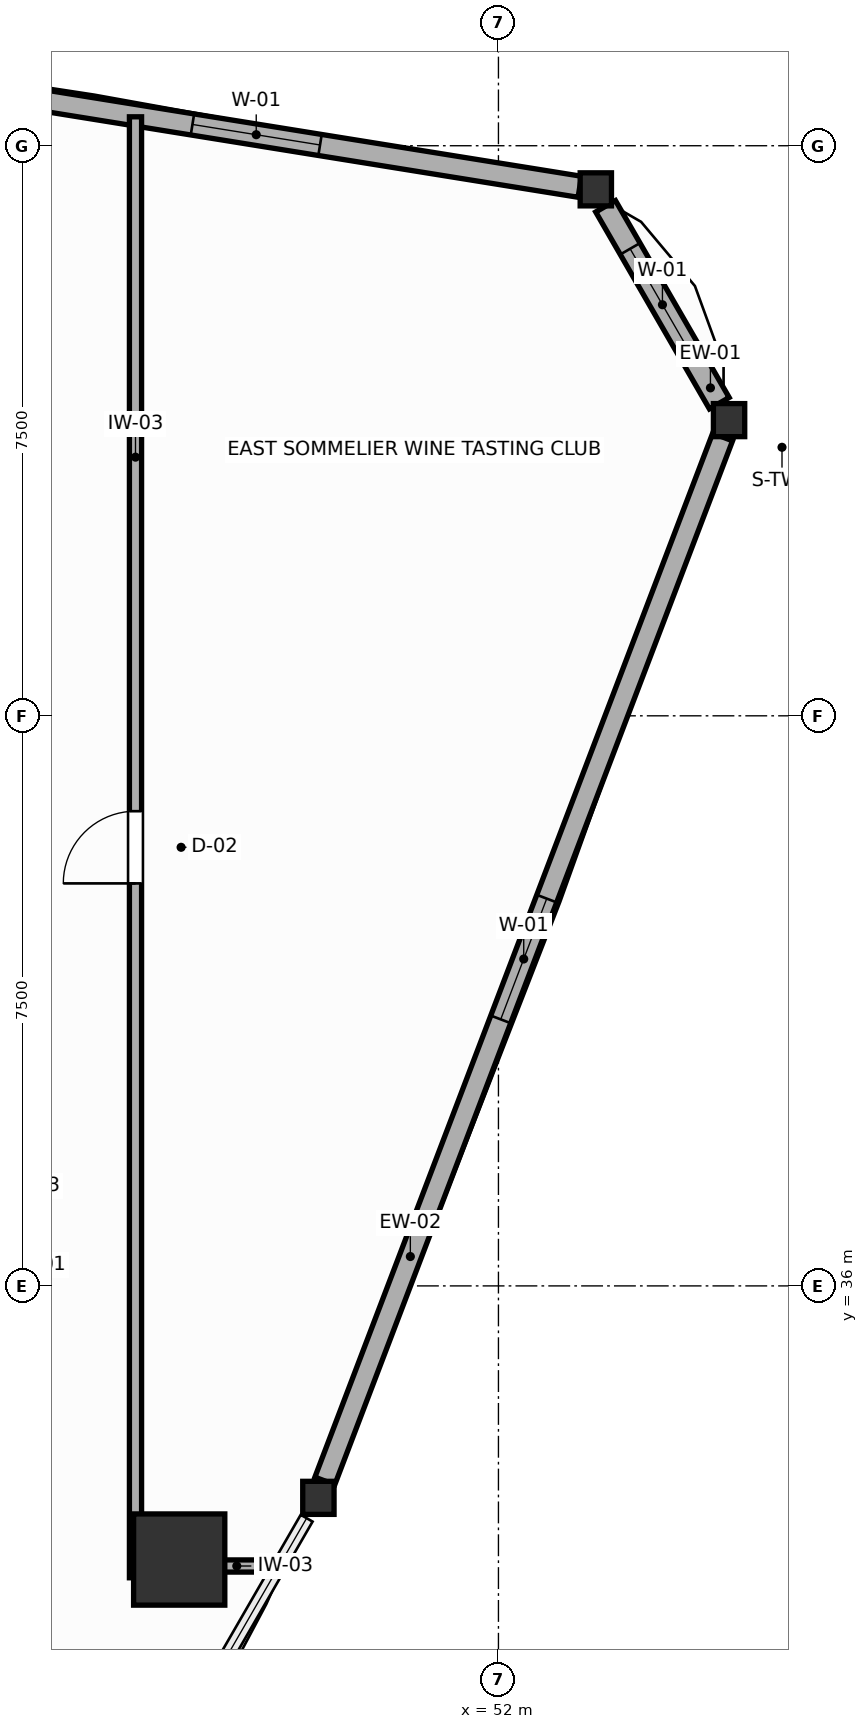
"""IFC4 building model, lengths in metres.
Left out: names, types, materials, properties, quantities, classifications, styles, units other than length and angle.
Written with IfcOpenShell. Run it as: python <this file> out.ifc"""

import sys

from ifc_helpers import new_model, si_unit, direction, frame, frame_2d, origin, origin_2d, place, context, subcontext, project, spatial, rectangle, i_section, extrude, source, transform, mapped, element, fill, save


model = new_model("IFC4")
c1 = context("Model", 3, precision=1e-05, world=origin(), true_north=direction((0.0, 1.0)))
c2 = subcontext(c1, "Body", "Model", "MODEL_VIEW")
j1 = project(units=[si_unit("LENGTHUNIT", "METRE"), si_unit("PLANEANGLEUNIT", "RADIAN")], contexts=[c1])
p1 = place(None, origin())
s1 = spatial("IfcSite", under=j1, at=p1, CompositionType="ELEMENT")
p2 = place(p1, origin())
s2 = spatial("IfcBuilding", under=s1, at=p2, CompositionType="ELEMENT")
p3 = place(p2, frame((0.0, 0.0, 147.0)))
s3 = spatial("IfcBuildingStorey", under=s2, at=p3, CompositionType="ELEMENT", Elevation=147.0)
m1 = source(origin(), c2, "Body", "SweptSolid", [
    extrude(rectangle(XDim=1.2, YDim=1.2, at=origin_2d()), origin(), (0.0, 0.0, 1.0), 3.6),
])
p4 = place(p3, frame((47.8, 32.4, 0.0), z_axis=(0.0, 0.0, 1.0), x_axis=(1.0, 0.0, 0.0)))
e1 = element("IfcColumn", 1, at=p4, inside=s3, PredefinedType="COLUMN", context=c2, shape_type="MappedRepresentation", body=[
    mapped(m1, transform((0.0, 0.0, 0.0), scale=1.0)),
])
m2 = source(origin(), c2, "Body", "SweptSolid", [
    extrude(i_section(OverallWidth=0.412, OverallDepth=0.435, WebThickness=0.033, FlangeThickness=0.053, FilletRadius=0.015, at=origin_2d()), origin(), (0.0, 0.0, 1.0), 3.6),
])
for number, where, z_axis, x_axis in (
    (2, (55.034, 47.39, 0.0), (0.0, 0.0, 1.0), (1.0, 0.0, 0.0)),
    (3, (53.281, 50.426, 0.0), (0.0, 0.0, 1.0), (1.0, 0.0, 0.0)),
    (4, (49.631, 33.212, 0.0), (0.0, 0.0, 1.0), (1.0, 0.0, 0.0)),
):
    element("IfcColumn", number, at=place(p3, frame(where, z_axis=z_axis, x_axis=x_axis)), inside=s3, PredefinedType="COLUMN", context=c2, shape_type="MappedRepresentation", body=[
        mapped(m2, transform((0.0, 0.0, 0.0), scale=1.0)),
    ])
p5 = place(p3, frame((54.906, 47.613, 0.0), z_axis=(0.0, 0.0, 1.0), x_axis=(-0.499974392705, 0.866040187658, 0.0)))
e5 = element("IfcWall", 5, at=p5, inside=s3, PredefinedType="SOLIDWALL", context=c2, shape_type="SweptSolid", body=[
    extrude(rectangle(XDim=2.992, YDim=0.3, at=frame_2d((1.496, 0.0))), origin(), (0.0, 0.0, 1.0), 3.0),
])
p6 = place(p5, frame((0.646, 0.0, 0.75)))
e6 = element("IfcOpeningElement", 6, at=p6, cuts=e5, PredefinedType="OPENING", context=c2, shape_type="SweptSolid", body=[
    extrude(rectangle(XDim=1.7, YDim=1.75, at=frame_2d((0.85, 0.875))), frame((0.0, 0.16, 0.0), z_axis=(0.0, -1.0, 0.0), x_axis=(1.0, 0.0, 0.0)), (0.0, 0.0, 1.0), 0.32),
])
p7 = place(p3, frame((53.07, 50.46, 0.0), z_axis=(0.0, 0.0, 1.0), x_axis=(-0.987303259595, 0.158846698404, 0.0)))
e7 = element("IfcWall", 7, at=p7, inside=s3, PredefinedType="SOLIDWALL", context=c2, shape_type="SweptSolid", body=[
    extrude(rectangle(XDim=14.746, YDim=0.28, at=frame_2d((7.373, 0.0))), origin(), (0.0, 0.0, 1.0), 3.0),
])
p8 = place(p7, frame((3.461, 0.0, 0.75)))
e8 = element("IfcOpeningElement", 8, at=p8, cuts=e7, PredefinedType="OPENING", context=c2, shape_type="SweptSolid", body=[
    extrude(rectangle(XDim=1.7, YDim=1.75, at=frame_2d((0.85, 0.875))), frame((0.0, 0.15, 0.0), z_axis=(0.0, -1.0, 0.0), x_axis=(1.0, 0.0, 0.0)), (0.0, 0.0, 1.0), 0.3),
])
p9 = place(p3, frame((49.716, 33.434, 0.0), z_axis=(0.0, 0.0, 1.0), x_axis=(0.356077530784, 0.934456415287, 0.0)))
e9 = element("IfcWall", 9, at=p9, inside=s3, PredefinedType="SOLIDWALL", context=c2, shape_type="SweptSolid", body=[
    extrude(rectangle(XDim=14.697, YDim=0.28, at=frame_2d((7.348, 0.0))), origin(), (0.0, 0.0, 1.0), 3.0),
])
p10 = place(p9, frame((6.498, 0.0, 0.75)))
e10 = element("IfcOpeningElement", 10, at=p10, cuts=e9, PredefinedType="OPENING", context=c2, shape_type="SweptSolid", body=[
    extrude(rectangle(XDim=1.7, YDim=1.75, at=frame_2d((0.85, 0.875))), frame((0.0, 0.15, 0.0), z_axis=(0.0, -1.0, 0.0), x_axis=(1.0, 0.0, 0.0)), (0.0, 0.0, 1.0), 0.3),
])
p11 = place(p3, frame((47.225, 32.16, 0.0), z_axis=(0.0, 0.0, 1.0), x_axis=(0.0, 1.0, 0.0)))
e11 = element("IfcWall", 11, at=p11, inside=s3, PredefinedType="PARTITIONING", context=c2, shape_type="SweptSolid", body=[
    extrude(rectangle(XDim=19.221, YDim=0.16, at=frame_2d((9.61, 0.0))), origin(), (0.0, 0.0, 1.0), 3.4),
])
p12 = place(p11, frame((9.135, 0.0, 0.0)))
e12 = element("IfcOpeningElement", 12, at=p12, cuts=e11, PredefinedType="OPENING", context=c2, shape_type="SweptSolid", body=[
    extrude(rectangle(XDim=0.95, YDim=2.05, at=frame_2d((0.475, 1.025))), frame((0.0, 0.09, 0.0), z_axis=(0.0, -1.0, 0.0), x_axis=(1.0, 0.0, 0.0)), (0.0, 0.0, 1.0), 0.18),
])
p13 = place(p3, frame((47.307, 32.315, 0.0), z_axis=(0.0, 0.0, 1.0), x_axis=(1.0, 0.0, 0.0)))
e13 = element("IfcWall", 13, at=p13, inside=s3, PredefinedType="PARTITIONING", context=c2, shape_type="SweptSolid", body=[
    extrude(rectangle(XDim=1.787, YDim=0.16, at=frame_2d((0.893, 0.0))), origin(), (0.0, 0.0, 1.0), 2.95),
])
p14 = place(p6, origin())
e14 = element("IfcWindow", 14, at=p14, inside=s3, PartitioningType="SINGLE_PANEL", PredefinedType="WINDOW", context=c2, shape_type="SweptSolid", body=[
    extrude(rectangle(XDim=1.7, YDim=1.75, at=frame_2d((0.85, 0.875))), frame((0.0, 0.03, 0.0), z_axis=(0.0, -1.0, 0.0), x_axis=(1.0, 0.0, 0.0)), (0.0, 0.0, 1.0), 0.06),
])
fill(e6, e14)
p15 = place(p8, origin())
e15 = element("IfcWindow", 15, at=p15, inside=s3, PartitioningType="SINGLE_PANEL", PredefinedType="WINDOW", context=c2, shape_type="SweptSolid", body=[
    extrude(rectangle(XDim=1.7, YDim=1.75, at=frame_2d((0.85, 0.875))), frame((0.0, 0.03, 0.0), z_axis=(0.0, -1.0, 0.0), x_axis=(1.0, 0.0, 0.0)), (0.0, 0.0, 1.0), 0.06),
])
fill(e8, e15)
p16 = place(p10, origin())
e16 = element("IfcWindow", 16, at=p16, inside=s3, PartitioningType="SINGLE_PANEL", PredefinedType="WINDOW", context=c2, shape_type="SweptSolid", body=[
    extrude(rectangle(XDim=1.7, YDim=1.75, at=frame_2d((0.85, 0.875))), frame((0.0, 0.03, 0.0), z_axis=(0.0, -1.0, 0.0), x_axis=(1.0, 0.0, 0.0)), (0.0, 0.0, 1.0), 0.06),
])
fill(e10, e16)
p17 = place(p12, origin())
e17 = element("IfcDoor", 17, at=p17, inside=s3, OperationType="SINGLE_SWING_LEFT", PredefinedType="DOOR", context=c2, shape_type="SweptSolid", body=[
    extrude(rectangle(XDim=0.95, YDim=2.05, at=frame_2d((0.475, 1.025))), frame((0.0, 0.025, 0.0), z_axis=(0.0, -1.0, 0.0), x_axis=(1.0, 0.0, 0.0)), (0.0, 0.0, 1.0), 0.05),
])
fill(e12, e17)
save(model, sys.argv[1])
